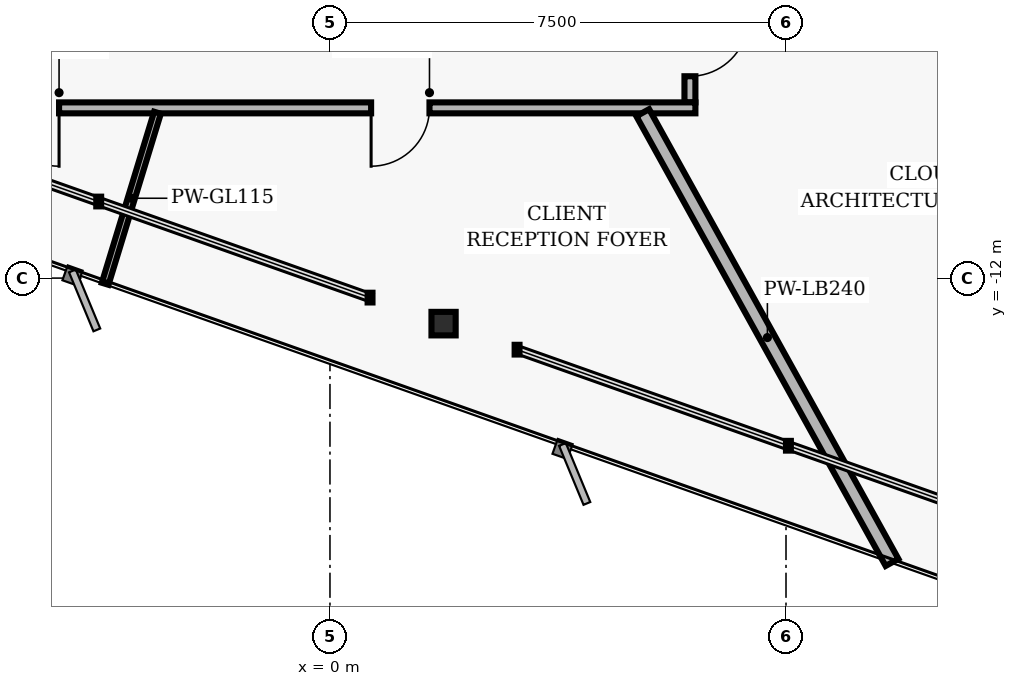
"""IFC4 building model, lengths in metres.
Left out: names, types, materials, properties, quantities, classifications, styles, units other than length and angle.
Written with IfcOpenShell. Run it as: python <this file> out.ifc"""

import sys

from ifc_helpers import new_model, si_unit, direction, frame, frame_2d, origin, origin_2d, place, context, subcontext, project, spatial, rectangle, i_section, extrude, element, fill, save


model = new_model("IFC4")
c1 = context("Model", 3, precision=1e-05, world=origin(), true_north=direction((0.0, 1.0)))
c2 = subcontext(c1, "Body", "Model", "MODEL_VIEW")
j1 = project(units=[si_unit("LENGTHUNIT", "METRE"), si_unit("PLANEANGLEUNIT", "RADIAN")], contexts=[c1])
p1 = place(None, origin())
s1 = spatial("IfcSite", under=j1, at=p1, CompositionType="ELEMENT")
p2 = place(p1, origin())
s2 = spatial("IfcBuilding", under=s1, at=p2, CompositionType="ELEMENT")
p3 = place(p2, frame((0.0, 0.0, 181.44)))
s3 = spatial("IfcBuildingStorey", under=s2, at=p3, CompositionType="ELEMENT", Elevation=181.44)
p4 = place(p3, frame((1.868, -12.749, 0.0), z_axis=(0.0, 0.0, 1.0), x_axis=(1.0, 0.0, 0.0)))
e1 = element("IfcColumn", 1, at=p4, inside=s3, PredefinedType="COLUMN", context=c2, shape_type="SweptSolid", body=[
    extrude(i_section(OverallWidth=0.398, OverallDepth=0.387, WebThickness=0.021, FlangeThickness=0.033, FilletRadius=0.018, at=origin_2d()), origin(), (0.0, 0.0, 1.0), 3.04),
])
p5 = place(p3, frame((5.92, -7.29, 0.0), z_axis=(0.0, 0.0, 1.0), x_axis=(0.0, -1.0, 0.0)))
e2 = element("IfcWall", 2, at=p5, inside=s3, PredefinedType="PARTITIONING", context=c2, shape_type="SweptSolid", body=[
    extrude(rectangle(XDim=1.82, YDim=0.18, at=frame_2d((0.91, 0.0))), origin(), (0.0, 0.0, 1.0), 2.773),
])
p6 = place(p5, frame((0.43, 0.0, 0.0)))
e3 = element("IfcOpeningElement", 3, at=p6, cuts=e2, PredefinedType="OPENING", context=c2, shape_type="SweptSolid", body=[
    extrude(rectangle(XDim=0.96, YDim=2.02, at=frame_2d((0.48, 1.01))), frame((0.0, 0.1, 0.0), z_axis=(0.0, -1.0, 0.0), x_axis=(1.0, 0.0, 0.0)), (0.0, 0.0, 1.0), 0.2),
])
p7 = place(p3, frame((6.01, -9.2, 0.0), z_axis=(0.0, 0.0, 1.0), x_axis=(-1.0, 0.0, 0.0)))
e4 = element("IfcWall", 4, at=p7, inside=s3, PredefinedType="PARTITIONING", context=c2, shape_type="SweptSolid", body=[
    extrude(rectangle(XDim=13.3, YDim=0.18, at=frame_2d((6.65, 0.0))), origin(), (0.0, 0.0, 1.0), 2.395),
])
p8 = place(p7, frame((10.465, 0.0, 0.0)))
e5 = element("IfcOpeningElement", 5, at=p8, cuts=e4, PredefinedType="OPENING", context=c2, shape_type="SweptSolid", body=[
    extrude(rectangle(XDim=0.96, YDim=2.02, at=frame_2d((0.48, 1.01))), frame((0.0, 0.1, 0.0), z_axis=(0.0, -1.0, 0.0), x_axis=(1.0, 0.0, 0.0)), (0.0, 0.0, 1.0), 0.2),
])
p9 = place(p7, frame((4.373, 0.0, 0.0)))
e6 = element("IfcOpeningElement", 6, at=p9, cuts=e4, PredefinedType="OPENING", context=c2, shape_type="SweptSolid", body=[
    extrude(rectangle(XDim=0.96, YDim=2.02, at=frame_2d((0.48, 1.01))), frame((0.0, 0.1, 0.0), z_axis=(0.0, -1.0, 0.0), x_axis=(1.0, 0.0, 0.0)), (0.0, 0.0, 1.0), 0.2),
])
p10 = place(p3, frame((-2.837, -9.28, 0.0), z_axis=(0.0, 0.0, 1.0), x_axis=(-0.292353462598, -0.95631033295, 0.0)))
e7 = element("IfcWall", 7, at=p10, inside=s3, PredefinedType="MOVABLE", context=c2, shape_type="SweptSolid", body=[
    extrude(rectangle(XDim=2.942, YDim=0.115, at=frame_2d((1.471, 0.0))), origin(), (0.0, 0.0, 1.0), 2.773),
])
p11 = place(p3, frame((5.144, -9.28, 0.0), z_axis=(0.0, 0.0, 1.0), x_axis=(0.484804355006, -0.874622625689, 0.0)))
e8 = element("IfcWall", 8, at=p11, inside=s3, PredefinedType="PARTITIONING", context=c2, shape_type="SweptSolid", body=[
    extrude(rectangle(XDim=8.456, YDim=0.24, at=frame_2d((4.228, 0.0))), origin(), (0.0, 0.0, 1.0), 2.773),
])
p12 = place(p8, origin())
e9 = element("IfcDoor", 9, at=p12, inside=s3, OperationType="SINGLE_SWING_LEFT", PredefinedType="DOOR", context=c2, shape_type="SweptSolid", body=[
    extrude(rectangle(XDim=0.96, YDim=2.02, at=frame_2d((0.48, 1.01))), frame((0.0, 0.025, 0.0), z_axis=(0.0, -1.0, 0.0), x_axis=(1.0, 0.0, 0.0)), (0.0, 0.0, 1.0), 0.05),
])
fill(e5, e9)
p13 = place(p9, origin())
e10 = element("IfcDoor", 10, at=p13, inside=s3, OperationType="SINGLE_SWING_RIGHT", PredefinedType="DOOR", context=c2, shape_type="SweptSolid", body=[
    extrude(rectangle(XDim=0.96, YDim=2.02, at=frame_2d((0.48, 1.01))), frame((0.0, 0.025, 0.0), z_axis=(0.0, -1.0, 0.0), x_axis=(1.0, 0.0, 0.0)), (0.0, 0.0, 1.0), 0.05),
])
fill(e6, e10)
p14 = place(p6, origin())
e11 = element("IfcDoor", 11, at=p14, inside=s3, OperationType="SINGLE_SWING_LEFT", PredefinedType="DOOR", context=c2, shape_type="SweptSolid", body=[
    extrude(rectangle(XDim=0.96, YDim=2.02, at=frame_2d((0.48, 1.01))), frame((0.0, 0.025, 0.0), z_axis=(0.0, -1.0, 0.0), x_axis=(1.0, 0.0, 0.0)), (0.0, 0.0, 1.0), 0.05),
])
fill(e3, e11)
save(model, sys.argv[1])
